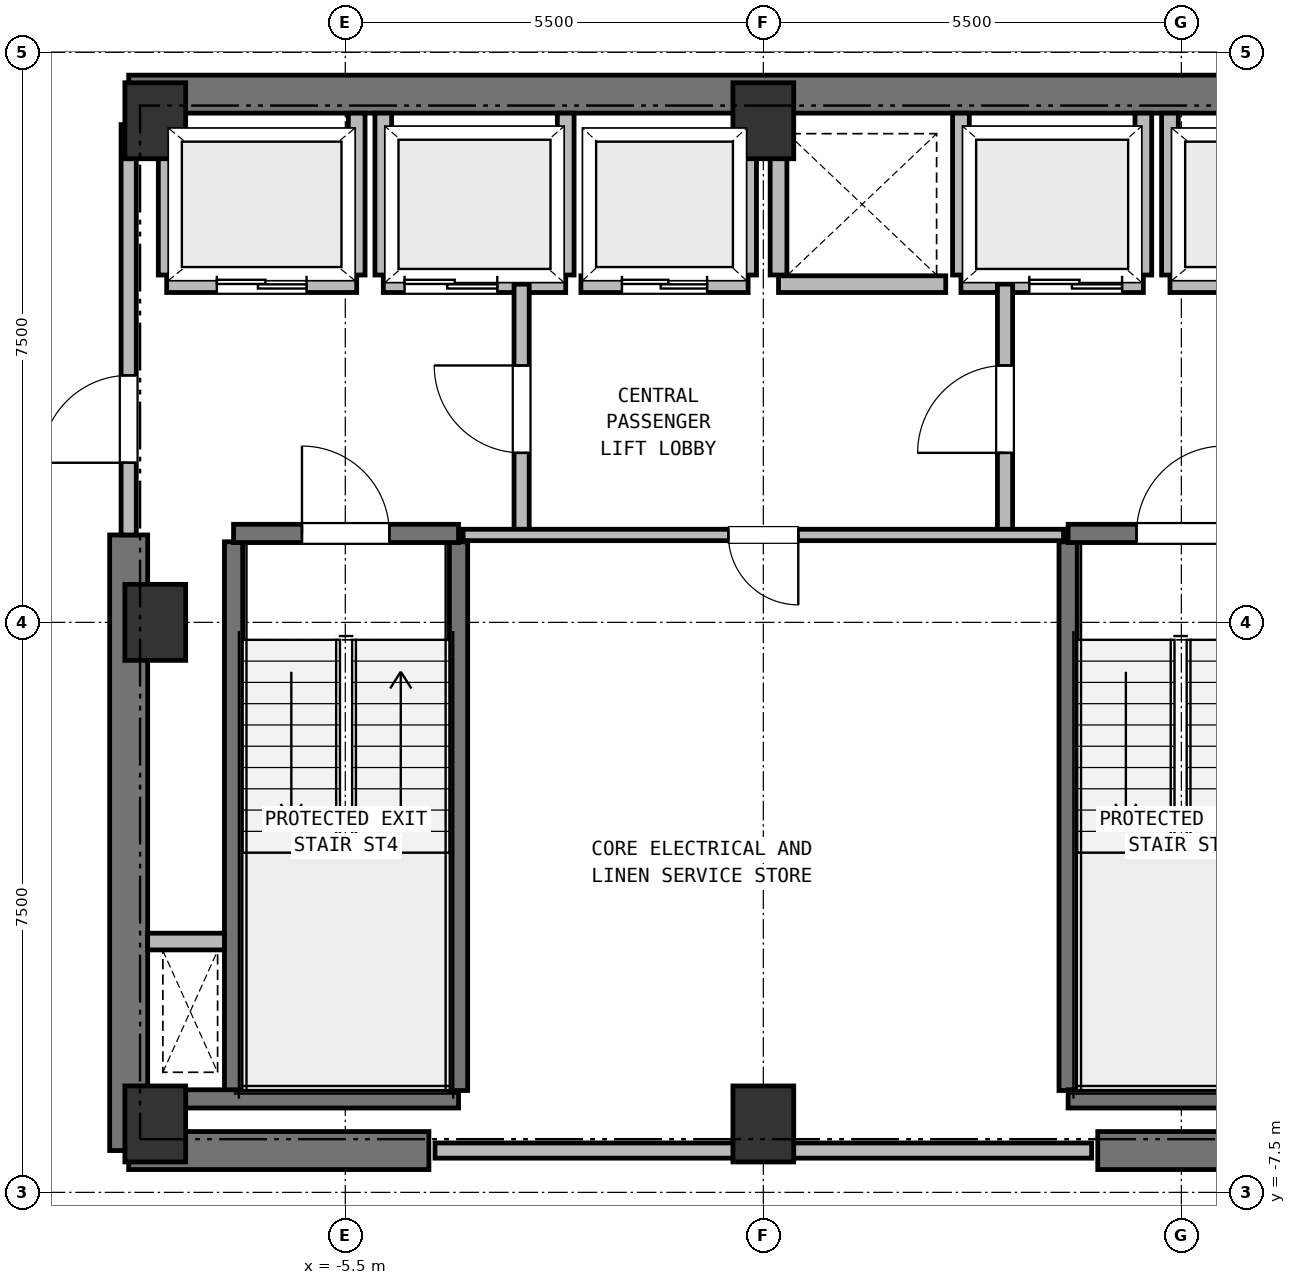
"""IFC4 building model, lengths in metres.
Left out: names, types, materials, properties, quantities, classifications, styles, units other than length and angle.
Written with IfcOpenShell. Run it as: python <this file> out.ifc"""

import sys

from ifc_helpers import new_model, si_unit, direction, frame, frame_2d, origin, origin_2d, place, context, subcontext, project, spatial, rectangle, extrude, element, fill, save


model = new_model("IFC4")
c1 = context("Model", 3, precision=1e-05, world=origin(), true_north=direction((0.0, 1.0)))
c2 = subcontext(c1, "Body", "Model", "MODEL_VIEW")
j1 = project(units=[si_unit("LENGTHUNIT", "METRE"), si_unit("PLANEANGLEUNIT", "RADIAN")], contexts=[c1])
p1 = place(None, origin())
s1 = spatial("IfcSite", under=j1, at=p1, CompositionType="ELEMENT")
p2 = place(p1, origin())
s2 = spatial("IfcBuilding", under=s1, at=p2, CompositionType="ELEMENT")
p3 = place(p2, frame((0.0, 0.0, 239.75)))
s3 = spatial("IfcBuildingStorey", under=s2, at=p3, CompositionType="ELEMENT", Elevation=239.75)
for number, where, z_axis, x_axis in (
    (1, (-8.0, -6.6, 0.0), (0.0, 0.0, 1.0), (1.0, 0.0, 0.0)),
    (2, (0.0, -6.6, 0.0), (0.0, 0.0, 1.0), (1.0, 0.0, 0.0)),
    (3, (0.0, 6.6, 0.0), (0.0, 0.0, 1.0), (1.0, 0.0, 0.0)),
    (4, (-8.0, 6.6, 0.0), (0.0, 0.0, 1.0), (1.0, 0.0, 0.0)),
    (5, (-8.0, 0.0, 0.0), (0.0, 0.0, 1.0), (1.0, 0.0, 0.0)),
):
    element("IfcColumn", number, at=place(p3, frame(where, z_axis=z_axis, x_axis=x_axis)), inside=s3, PredefinedType="COLUMN", context=c2, shape_type="SweptSolid", body=[
        extrude(rectangle(XDim=0.8, YDim=1.0, at=origin_2d()), origin(), (0.0, 0.0, 1.0), 3.8),
    ])
p4 = place(p3, frame((-8.35, 6.95, 0.0), z_axis=(0.0, 0.0, 1.0), x_axis=(1.0, 0.0, 0.0)))
e6 = element("IfcWall", 6, at=p4, inside=s3, PredefinedType="SHEAR", context=c2, shape_type="SweptSolid", body=[
    extrude(rectangle(XDim=16.7, YDim=0.5, at=frame_2d((8.35, 0.0))), origin(), (0.0, 0.0, 1.0), 3.55),
])
for number, where, z_axis, x_axis in (
    (7, (-8.35, -6.95, 0.0), (0.0, 0.0, 1.0), (1.0, 0.0, 0.0)),
    (8, (4.4, -6.95, 0.0), (0.0, 0.0, 1.0), (1.0, 0.0, 0.0)),
):
    element("IfcWall", number, at=place(p3, frame(where, z_axis=z_axis, x_axis=x_axis)), inside=s3, PredefinedType="SHEAR", context=c2, shape_type="SweptSolid", body=[
        extrude(rectangle(XDim=3.95, YDim=0.5, at=frame_2d((1.975, 0.0))), origin(), (0.0, 0.0, 1.0), 3.55),
    ])
p5 = place(p3, frame((-8.35, -6.95, 0.0), z_axis=(0.0, 0.0, 1.0), x_axis=(0.0, 1.0, 0.0)))
e9 = element("IfcWall", 9, at=p5, inside=s3, PredefinedType="SHEAR", context=c2, shape_type="SweptSolid", body=[
    extrude(rectangle(XDim=8.1, YDim=0.5, at=frame_2d((4.05, 0.0))), origin(), (0.0, 0.0, 1.0), 3.55),
])
p6 = place(p3, frame((-6.97, -6.16, 0.0), z_axis=(0.0, 0.0, 1.0), x_axis=(0.0, 1.0, 0.0)))
e10 = element("IfcWall", 10, at=p6, inside=s3, PredefinedType="SHEAR", context=c2, shape_type="SweptSolid", body=[
    extrude(rectangle(XDim=7.22, YDim=0.24, at=frame_2d((3.61, 0.0))), origin(), (0.0, 0.0, 1.0), 3.55),
])
p7 = place(p3, frame((-7.6, -6.27, 0.0), z_axis=(0.0, 0.0, 1.0), x_axis=(1.0, 0.0, 0.0)))
e11 = element("IfcWall", 11, at=p7, inside=s3, PredefinedType="SHEAR", context=c2, shape_type="SweptSolid", body=[
    extrude(rectangle(XDim=3.59, YDim=0.24, at=frame_2d((1.795, 0.0))), origin(), (0.0, 0.0, 1.0), 3.55),
])
p8 = place(p3, frame((-4.01, -6.16, 0.0), z_axis=(0.0, 0.0, 1.0), x_axis=(0.0, 1.0, 0.0)))
e12 = element("IfcWall", 12, at=p8, inside=s3, PredefinedType="SHEAR", context=c2, shape_type="SweptSolid", body=[
    extrude(rectangle(XDim=7.22, YDim=0.24, at=frame_2d((3.61, 0.0))), origin(), (0.0, 0.0, 1.0), 3.55),
])
p9 = place(p3, frame((-6.97, 1.17, 0.0), z_axis=(0.0, 0.0, 1.0), x_axis=(1.0, 0.0, 0.0)))
e13 = element("IfcWall", 13, at=p9, inside=s3, PredefinedType="SHEAR", context=c2, shape_type="SweptSolid", body=[
    extrude(rectangle(XDim=2.96, YDim=0.24, at=frame_2d((1.48, 0.0))), origin(), (0.0, 0.0, 1.0), 3.55),
])
p10 = place(p9, frame((0.9, 0.0, 0.0)))
e14 = element("IfcOpeningElement", 14, at=p10, cuts=e13, PredefinedType="OPENING", context=c2, shape_type="SweptSolid", body=[
    extrude(rectangle(XDim=1.15, YDim=2.15, at=frame_2d((0.575, 1.075))), frame((0.0, 0.13, 0.0), z_axis=(0.0, -1.0, 0.0), x_axis=(1.0, 0.0, 0.0)), (0.0, 0.0, 1.0), 0.26),
])
p11 = place(p3, frame((4.01, -6.16, 0.0), z_axis=(0.0, 0.0, 1.0), x_axis=(0.0, 1.0, 0.0)))
e15 = element("IfcWall", 15, at=p11, inside=s3, PredefinedType="SHEAR", context=c2, shape_type="SweptSolid", body=[
    extrude(rectangle(XDim=7.22, YDim=0.24, at=frame_2d((3.61, 0.0))), origin(), (0.0, 0.0, 1.0), 3.55),
])
p12 = place(p3, frame((4.01, -6.27, 0.0), z_axis=(0.0, 0.0, 1.0), x_axis=(1.0, 0.0, 0.0)))
e16 = element("IfcWall", 16, at=p12, inside=s3, PredefinedType="SHEAR", context=c2, shape_type="SweptSolid", body=[
    extrude(rectangle(XDim=3.59, YDim=0.24, at=frame_2d((1.795, 0.0))), origin(), (0.0, 0.0, 1.0), 3.55),
])
p13 = place(p3, frame((4.01, 1.17, 0.0), z_axis=(0.0, 0.0, 1.0), x_axis=(1.0, 0.0, 0.0)))
e17 = element("IfcWall", 17, at=p13, inside=s3, PredefinedType="SHEAR", context=c2, shape_type="SweptSolid", body=[
    extrude(rectangle(XDim=2.96, YDim=0.24, at=frame_2d((1.48, 0.0))), origin(), (0.0, 0.0, 1.0), 3.55),
])
p14 = place(p13, frame((0.9, 0.0, 0.0)))
e18 = element("IfcOpeningElement", 18, at=p14, cuts=e17, PredefinedType="OPENING", context=c2, shape_type="SweptSolid", body=[
    extrude(rectangle(XDim=1.15, YDim=2.15, at=frame_2d((0.575, 1.075))), frame((0.0, 0.13, 0.0), z_axis=(0.0, -1.0, 0.0), x_axis=(1.0, 0.0, 0.0)), (0.0, 0.0, 1.0), 0.26),
])
p15 = place(p3, frame((-8.1, -4.2, 0.0), z_axis=(0.0, 0.0, 1.0), x_axis=(1.0, 0.0, 0.0)))
e19 = element("IfcWall", 19, at=p15, inside=s3, PredefinedType="PARTITIONING", context=c2, shape_type="SweptSolid", body=[
    extrude(rectangle(XDim=1.01, YDim=0.22, at=frame_2d((0.505, 0.0))), origin(), (0.0, 0.0, 1.0), 3.55),
])
p16 = place(p3, frame((-7.85, 4.45, 0.0), z_axis=(0.0, 0.0, 1.0), x_axis=(1.0, 0.0, 0.0)))
e20 = element("IfcWall", 20, at=p16, inside=s3, PredefinedType="PARTITIONING", context=c2, shape_type="SweptSolid", body=[
    extrude(rectangle(XDim=2.5, YDim=0.22, at=frame_2d((1.25, 0.0))), origin(), (0.0, 0.0, 1.0), 3.55),
])
p17 = place(p16, frame((0.66, 0.0, 0.0)))
e21 = element("IfcOpeningElement", 21, at=p17, cuts=e20, PredefinedType="OPENING", context=c2, shape_type="SweptSolid", body=[
    extrude(rectangle(XDim=1.18, YDim=2.15, at=frame_2d((0.59, 1.075))), frame((0.0, 0.12, 0.0), z_axis=(0.0, -1.0, 0.0), x_axis=(1.0, 0.0, 0.0)), (0.0, 0.0, 1.0), 0.24),
])
p18 = place(p3, frame((-7.85, 4.57, 0.0), z_axis=(0.0, 0.0, 1.0), x_axis=(0.0, 1.0, 0.0)))
e22 = element("IfcWall", 22, at=p18, inside=s3, PredefinedType="PARTITIONING", context=c2, shape_type="SweptSolid", body=[
    extrude(rectangle(XDim=2.13, YDim=0.22, at=frame_2d((1.065, 0.0))), origin(), (0.0, 0.0, 1.0), 3.18),
])
p19 = place(p3, frame((-5.35, 4.57, 0.0), z_axis=(0.0, 0.0, 1.0), x_axis=(0.0, 1.0, 0.0)))
e23 = element("IfcWall", 23, at=p19, inside=s3, PredefinedType="PARTITIONING", context=c2, shape_type="SweptSolid", body=[
    extrude(rectangle(XDim=2.13, YDim=0.22, at=frame_2d((1.065, 0.0))), origin(), (0.0, 0.0, 1.0), 3.55),
])
p20 = place(p3, frame((5.35, 4.45, 0.0), z_axis=(0.0, 0.0, 1.0), x_axis=(1.0, 0.0, 0.0)))
e24 = element("IfcWall", 24, at=p20, inside=s3, PredefinedType="PARTITIONING", context=c2, shape_type="SweptSolid", body=[
    extrude(rectangle(XDim=2.5, YDim=0.22, at=frame_2d((1.25, 0.0))), origin(), (0.0, 0.0, 1.0), 3.55),
])
p21 = place(p20, frame((0.66, 0.0, 0.0)))
e25 = element("IfcOpeningElement", 25, at=p21, cuts=e24, PredefinedType="OPENING", context=c2, shape_type="SweptSolid", body=[
    extrude(rectangle(XDim=1.18, YDim=2.15, at=frame_2d((0.59, 1.075))), frame((0.0, 0.12, 0.0), z_axis=(0.0, -1.0, 0.0), x_axis=(1.0, 0.0, 0.0)), (0.0, 0.0, 1.0), 0.24),
])
p22 = place(p3, frame((5.35, 4.57, 0.0), z_axis=(0.0, 0.0, 1.0), x_axis=(0.0, 1.0, 0.0)))
e26 = element("IfcWall", 26, at=p22, inside=s3, PredefinedType="PARTITIONING", context=c2, shape_type="SweptSolid", body=[
    extrude(rectangle(XDim=2.13, YDim=0.22, at=frame_2d((1.065, 0.0))), origin(), (0.0, 0.0, 1.0), 3.55),
])
p23 = place(p3, frame((-5.0, 4.45, 0.0), z_axis=(0.0, 0.0, 1.0), x_axis=(1.0, 0.0, 0.0)))
e27 = element("IfcWall", 27, at=p23, inside=s3, PredefinedType="PARTITIONING", context=c2, shape_type="SweptSolid", body=[
    extrude(rectangle(XDim=2.4, YDim=0.22, at=frame_2d((1.2, 0.0))), origin(), (0.0, 0.0, 1.0), 3.55),
])
p24 = place(p23, frame((0.28, 0.0, 0.0)))
e28 = element("IfcOpeningElement", 28, at=p24, cuts=e27, PredefinedType="OPENING", context=c2, shape_type="SweptSolid", body=[
    extrude(rectangle(XDim=1.22, YDim=2.15, at=frame_2d((0.61, 1.075))), frame((0.0, 0.12, 0.0), z_axis=(0.0, -1.0, 0.0), x_axis=(1.0, 0.0, 0.0)), (0.0, 0.0, 1.0), 0.24),
])
for number, where, z_axis, x_axis in (
    (29, (-5.0, 4.57, 0.0), (0.0, 0.0, 1.0), (0.0, 1.0, 0.0)),
    (30, (-2.6, 4.57, 0.0), (0.0, 0.0, 1.0), (0.0, 1.0, 0.0)),
):
    element("IfcWall", number, at=place(p3, frame(where, z_axis=z_axis, x_axis=x_axis)), inside=s3, PredefinedType="PARTITIONING", context=c2, shape_type="SweptSolid", body=[
        extrude(rectangle(XDim=2.13, YDim=0.22, at=frame_2d((1.065, 0.0))), origin(), (0.0, 0.0, 1.0), 3.55),
    ])
p25 = place(p3, frame((2.6, 4.45, 0.0), z_axis=(0.0, 0.0, 1.0), x_axis=(1.0, 0.0, 0.0)))
e31 = element("IfcWall", 31, at=p25, inside=s3, PredefinedType="PARTITIONING", context=c2, shape_type="SweptSolid", body=[
    extrude(rectangle(XDim=2.4, YDim=0.22, at=frame_2d((1.2, 0.0))), origin(), (0.0, 0.0, 1.0), 3.55),
])
p26 = place(p25, frame((0.9, 0.0, 0.0)))
e32 = element("IfcOpeningElement", 32, at=p26, cuts=e31, PredefinedType="OPENING", context=c2, shape_type="SweptSolid", body=[
    extrude(rectangle(XDim=1.22, YDim=2.15, at=frame_2d((0.61, 1.075))), frame((0.0, 0.12, 0.0), z_axis=(0.0, -1.0, 0.0), x_axis=(1.0, 0.0, 0.0)), (0.0, 0.0, 1.0), 0.24),
])
for number, where, z_axis, x_axis in (
    (33, (2.6, 4.57, 0.0), (0.0, 0.0, 1.0), (0.0, 1.0, 0.0)),
    (34, (5.0, 4.57, 0.0), (0.0, 0.0, 1.0), (0.0, 1.0, 0.0)),
):
    element("IfcWall", number, at=place(p3, frame(where, z_axis=z_axis, x_axis=x_axis)), inside=s3, PredefinedType="PARTITIONING", context=c2, shape_type="SweptSolid", body=[
        extrude(rectangle(XDim=2.13, YDim=0.22, at=frame_2d((1.065, 0.0))), origin(), (0.0, 0.0, 1.0), 3.55),
    ])
p27 = place(p3, frame((-2.4, 4.45, 0.0), z_axis=(0.0, 0.0, 1.0), x_axis=(1.0, 0.0, 0.0)))
e35 = element("IfcWall", 35, at=p27, inside=s3, PredefinedType="PARTITIONING", context=c2, shape_type="SweptSolid", body=[
    extrude(rectangle(XDim=2.2, YDim=0.22, at=frame_2d((1.1, 0.0))), origin(), (0.0, 0.0, 1.0), 3.55),
])
p28 = place(p27, frame((0.54, 0.0, 0.0)))
e36 = element("IfcOpeningElement", 36, at=p28, cuts=e35, PredefinedType="OPENING", context=c2, shape_type="SweptSolid", body=[
    extrude(rectangle(XDim=1.12, YDim=2.15, at=frame_2d((0.56, 1.075))), frame((0.0, 0.12, 0.0), z_axis=(0.0, -1.0, 0.0), x_axis=(1.0, 0.0, 0.0)), (0.0, 0.0, 1.0), 0.24),
])
p29 = place(p3, frame((-0.2, 4.57, 0.0), z_axis=(0.0, 0.0, 1.0), x_axis=(0.0, 1.0, 0.0)))
e37 = element("IfcWall", 37, at=p29, inside=s3, PredefinedType="PARTITIONING", context=c2, shape_type="SweptSolid", body=[
    extrude(rectangle(XDim=2.13, YDim=0.22, at=frame_2d((1.065, 0.0))), origin(), (0.0, 0.0, 1.0), 3.55),
])
p30 = place(p3, frame((0.2, 4.45, 0.0), z_axis=(0.0, 0.0, 1.0), x_axis=(1.0, 0.0, 0.0)))
e38 = element("IfcWall", 38, at=p30, inside=s3, PredefinedType="PARTITIONING", context=c2, shape_type="SweptSolid", body=[
    extrude(rectangle(XDim=2.2, YDim=0.22, at=frame_2d((1.1, 0.0))), origin(), (0.0, 0.0, 1.0), 3.55),
])
p31 = place(p3, frame((0.2, 4.57, 0.0), z_axis=(0.0, 0.0, 1.0), x_axis=(0.0, 1.0, 0.0)))
e39 = element("IfcWall", 39, at=p31, inside=s3, PredefinedType="PARTITIONING", context=c2, shape_type="SweptSolid", body=[
    extrude(rectangle(XDim=2.13, YDim=0.22, at=frame_2d((1.065, 0.0))), origin(), (0.0, 0.0, 1.0), 3.55),
])
p32 = place(p3, frame((-3.18, 1.15, 0.0), z_axis=(0.0, 0.0, 1.0), x_axis=(0.0, 1.0, 0.0)))
e40 = element("IfcWall", 40, at=p32, inside=s3, PredefinedType="PARTITIONING", context=c2, shape_type="SweptSolid", body=[
    extrude(rectangle(XDim=3.3, YDim=0.2, at=frame_2d((1.65, 0.0))), origin(), (0.0, 0.0, 1.0), 3.55),
])
p33 = place(p32, frame((1.08, 0.0, 0.0)))
e41 = element("IfcOpeningElement", 41, at=p33, cuts=e40, PredefinedType="OPENING", context=c2, shape_type="SweptSolid", body=[
    extrude(rectangle(XDim=1.15, YDim=2.15, at=frame_2d((0.575, 1.075))), frame((0.0, 0.11, 0.0), z_axis=(0.0, -1.0, 0.0), x_axis=(1.0, 0.0, 0.0)), (0.0, 0.0, 1.0), 0.22),
])
p34 = place(p3, frame((3.18, 1.15, 0.0), z_axis=(0.0, 0.0, 1.0), x_axis=(0.0, 1.0, 0.0)))
e42 = element("IfcWall", 42, at=p34, inside=s3, PredefinedType="PARTITIONING", context=c2, shape_type="SweptSolid", body=[
    extrude(rectangle(XDim=3.3, YDim=0.2, at=frame_2d((1.65, 0.0))), origin(), (0.0, 0.0, 1.0), 3.55),
])
p35 = place(p34, frame((1.08, 0.0, 0.0)))
e43 = element("IfcOpeningElement", 43, at=p35, cuts=e42, PredefinedType="OPENING", context=c2, shape_type="SweptSolid", body=[
    extrude(rectangle(XDim=1.15, YDim=2.15, at=frame_2d((0.575, 1.075))), frame((0.0, 0.11, 0.0), z_axis=(0.0, -1.0, 0.0), x_axis=(1.0, 0.0, 0.0)), (0.0, 0.0, 1.0), 0.22),
])
p36 = place(p3, frame((-8.35, 1.15, 0.0), z_axis=(0.0, 0.0, 1.0), x_axis=(0.0, 1.0, 0.0)))
e44 = element("IfcWall", 44, at=p36, inside=s3, PredefinedType="PARTITIONING", context=c2, shape_type="SweptSolid", body=[
    extrude(rectangle(XDim=5.4, YDim=0.2, at=frame_2d((2.7, 0.0))), origin(), (0.0, 0.0, 1.0), 3.55),
])
p37 = place(p36, frame((0.95, 0.0, 0.0)))
e45 = element("IfcOpeningElement", 45, at=p37, cuts=e44, PredefinedType="OPENING", context=c2, shape_type="SweptSolid", body=[
    extrude(rectangle(XDim=1.15, YDim=2.15, at=frame_2d((0.575, 1.075))), frame((0.0, 0.11, 0.0), z_axis=(0.0, -1.0, 0.0), x_axis=(1.0, 0.0, 0.0)), (0.0, 0.0, 1.0), 0.22),
])
p38 = place(p3, frame((3.95, 1.15, 0.0), z_axis=(0.0, 0.0, 1.0), x_axis=(-1.0, 0.0, 0.0)))
e46 = element("IfcWall", 46, at=p38, inside=s3, PredefinedType="PARTITIONING", context=c2, shape_type="SweptSolid", body=[
    extrude(rectangle(XDim=7.9, YDim=0.15, at=frame_2d((3.95, 0.0))), origin(), (0.0, 0.0, 1.0), 3.55),
])
p39 = place(p38, frame((3.49, 0.0, 0.0)))
e47 = element("IfcOpeningElement", 47, at=p39, cuts=e46, PredefinedType="OPENING", context=c2, shape_type="SweptSolid", body=[
    extrude(rectangle(XDim=0.92, YDim=2.05, at=frame_2d((0.46, 1.025))), frame((0.0, 0.085, 0.0), z_axis=(0.0, -1.0, 0.0), x_axis=(1.0, 0.0, 0.0)), (0.0, 0.0, 1.0), 0.17),
])
p40 = place(p3, frame((-4.32, -6.95, 0.0), z_axis=(0.0, 0.0, 1.0), x_axis=(1.0, 0.0, 0.0)))
e48 = element("IfcWall", 48, at=p40, inside=s3, PredefinedType="PARTITIONING", context=c2, shape_type="SweptSolid", body=[
    extrude(rectangle(XDim=8.64, YDim=0.2, at=frame_2d((4.32, 0.0))), origin(), (0.0, 0.0, 1.0), 3.55),
])
p41 = place(p3, frame((-10.422, 7.309, 0.0), z_axis=(0.0, 0.0, 1.0), x_axis=(0.689960858356, 0.723846678473, 0.0)))
e49 = element("IfcWall", 49, at=p41, inside=s3, PredefinedType="PARTITIONING", context=c2, shape_type="SweptSolid", body=[
    extrude(rectangle(XDim=2.572, YDim=0.15, at=frame_2d((1.286, 0.0))), origin(), (0.0, 0.0, 1.0), 3.55),
])
p42 = place(p3, frame((-8.648, -9.151, 0.0), z_axis=(0.0, 0.0, 1.0), x_axis=(-0.693764562202, 0.720201869085, 0.0)))
e50 = element("IfcWall", 50, at=p42, inside=s3, PredefinedType="PARTITIONING", context=c2, shape_type="SweptSolid", body=[
    extrude(rectangle(XDim=2.558, YDim=0.15, at=frame_2d((1.279, 0.0))), origin(), (0.0, 0.0, 1.0), 3.23),
])
p43 = place(p10, origin())
e51 = element("IfcDoor", 51, at=p43, inside=s3, OperationType="SINGLE_SWING_LEFT", PredefinedType="DOOR", context=c2, shape_type="SweptSolid", body=[
    extrude(rectangle(XDim=1.15, YDim=2.15, at=frame_2d((0.575, 1.075))), frame((0.0, 0.025, 0.0), z_axis=(0.0, -1.0, 0.0), x_axis=(1.0, 0.0, 0.0)), (0.0, 0.0, 1.0), 0.05),
])
fill(e14, e51)
p44 = place(p14, origin())
e52 = element("IfcDoor", 52, at=p44, inside=s3, OperationType="SINGLE_SWING_RIGHT", PredefinedType="DOOR", context=c2, shape_type="SweptSolid", body=[
    extrude(rectangle(XDim=1.15, YDim=2.15, at=frame_2d((0.575, 1.075))), frame((0.0, 0.025, 0.0), z_axis=(0.0, -1.0, 0.0), x_axis=(1.0, 0.0, 0.0)), (0.0, 0.0, 1.0), 0.05),
])
fill(e18, e52)
p45 = place(p17, origin())
e53 = element("IfcDoor", 53, at=p45, inside=s3, OperationType="DOUBLE_DOOR_SLIDING", PredefinedType="DOOR", context=c2, shape_type="SweptSolid", body=[
    extrude(rectangle(XDim=1.18, YDim=2.15, at=frame_2d((0.59, 1.075))), frame((0.0, 0.025, 0.0), z_axis=(0.0, -1.0, 0.0), x_axis=(1.0, 0.0, 0.0)), (0.0, 0.0, 1.0), 0.05),
])
fill(e21, e53)
p46 = place(p24, origin())
e54 = element("IfcDoor", 54, at=p46, inside=s3, OperationType="DOUBLE_DOOR_SLIDING", PredefinedType="DOOR", context=c2, shape_type="SweptSolid", body=[
    extrude(rectangle(XDim=1.22, YDim=2.15, at=frame_2d((0.61, 1.075))), frame((0.0, 0.025, 0.0), z_axis=(0.0, -1.0, 0.0), x_axis=(1.0, 0.0, 0.0)), (0.0, 0.0, 1.0), 0.05),
])
fill(e28, e54)
p47 = place(p26, origin())
e55 = element("IfcDoor", 55, at=p47, inside=s3, OperationType="DOUBLE_DOOR_SLIDING", PredefinedType="DOOR", context=c2, shape_type="SweptSolid", body=[
    extrude(rectangle(XDim=1.22, YDim=2.15, at=frame_2d((0.61, 1.075))), frame((0.0, 0.025, 0.0), z_axis=(0.0, -1.0, 0.0), x_axis=(1.0, 0.0, 0.0)), (0.0, 0.0, 1.0), 0.05),
])
fill(e32, e55)
p48 = place(p28, origin())
e56 = element("IfcDoor", 56, at=p48, inside=s3, OperationType="DOUBLE_DOOR_SLIDING", PredefinedType="DOOR", context=c2, shape_type="SweptSolid", body=[
    extrude(rectangle(XDim=1.12, YDim=2.15, at=frame_2d((0.56, 1.075))), frame((0.0, 0.025, 0.0), z_axis=(0.0, -1.0, 0.0), x_axis=(1.0, 0.0, 0.0)), (0.0, 0.0, 1.0), 0.05),
])
fill(e36, e56)
p49 = place(p33, origin())
e57 = element("IfcDoor", 57, at=p49, inside=s3, OperationType="SINGLE_SWING_RIGHT", PredefinedType="DOOR", context=c2, shape_type="SweptSolid", body=[
    extrude(rectangle(XDim=1.15, YDim=2.15, at=frame_2d((0.575, 1.075))), frame((0.0, 0.025, 0.0), z_axis=(0.0, -1.0, 0.0), x_axis=(1.0, 0.0, 0.0)), (0.0, 0.0, 1.0), 0.05),
])
fill(e41, e57)
p50 = place(p35, origin())
e58 = element("IfcDoor", 58, at=p50, inside=s3, OperationType="SINGLE_SWING_LEFT", PredefinedType="DOOR", context=c2, shape_type="SweptSolid", body=[
    extrude(rectangle(XDim=1.15, YDim=2.15, at=frame_2d((0.575, 1.075))), frame((0.0, 0.025, 0.0), z_axis=(0.0, -1.0, 0.0), x_axis=(1.0, 0.0, 0.0)), (0.0, 0.0, 1.0), 0.05),
])
fill(e43, e58)
p51 = place(p37, origin())
e59 = element("IfcDoor", 59, at=p51, inside=s3, OperationType="SINGLE_SWING_LEFT", PredefinedType="DOOR", context=c2, shape_type="SweptSolid", body=[
    extrude(rectangle(XDim=1.15, YDim=2.15, at=frame_2d((0.575, 1.075))), frame((0.0, 0.025, 0.0), z_axis=(0.0, -1.0, 0.0), x_axis=(1.0, 0.0, 0.0)), (0.0, 0.0, 1.0), 0.05),
])
fill(e45, e59)
p52 = place(p39, origin())
e60 = element("IfcDoor", 60, at=p52, inside=s3, OperationType="SINGLE_SWING_LEFT", PredefinedType="DOOR", context=c2, shape_type="SweptSolid", body=[
    extrude(rectangle(XDim=0.92, YDim=2.05, at=frame_2d((0.46, 1.025))), frame((0.0, 0.025, 0.0), z_axis=(0.0, -1.0, 0.0), x_axis=(1.0, 0.0, 0.0)), (0.0, 0.0, 1.0), 0.05),
])
fill(e47, e60)
save(model, sys.argv[1])
